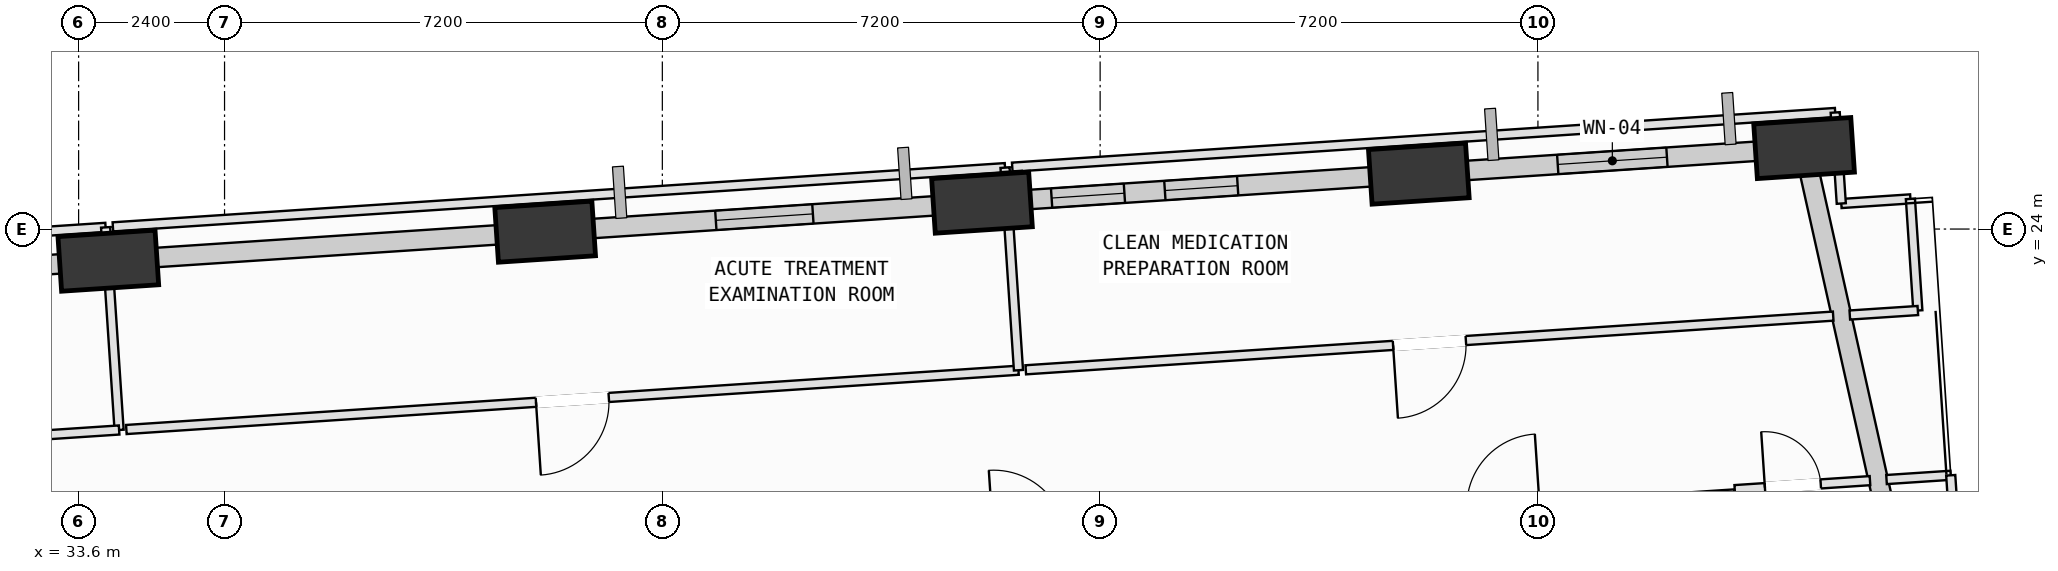
"""IFC4 building model, lengths in metres.
Left out: names, types, materials, properties, quantities, classifications, styles, units other than length and angle.
Written with IfcOpenShell. Run it as: python <this file> out.ifc"""

import sys

from ifc_helpers import new_model, si_unit, direction, frame, frame_2d, origin, origin_2d, place, context, subcontext, project, spatial, rectangle, extrude, element, fill, save


model = new_model("IFC4")
c1 = context("Model", 3, precision=1e-05, world=origin(), true_north=direction((0.0, 1.0)))
c2 = subcontext(c1, "Body", "Model", "MODEL_VIEW")
j1 = project(units=[si_unit("LENGTHUNIT", "METRE"), si_unit("PLANEANGLEUNIT", "RADIAN")], contexts=[c1])
p1 = place(None, origin())
s1 = spatial("IfcSite", under=j1, at=p1, CompositionType="ELEMENT")
p2 = place(p1, origin())
s2 = spatial("IfcBuilding", under=s1, at=p2, CompositionType="ELEMENT")
p3 = place(p2, frame((0.0, 0.0, 39.0)))
s3 = spatial("IfcBuildingStorey", under=s2, at=p3, CompositionType="ELEMENT", Elevation=39.0)
p4 = place(p3, frame((61.977, 25.332, 0.002), z_axis=(-0.003154789088, 0.116787865274, 0.99315187249), x_axis=(-0.995660271047, -0.092739816364, 0.007742810776)))
e1 = element("IfcColumn", 1, at=p4, inside=s3, PredefinedType="COLUMN", context=c2, shape_type="SweptSolid", body=[
    extrude(rectangle(XDim=1.6, YDim=0.9, at=origin_2d()), origin(), (0.0, 0.0, 1.0), 4.024),
])
p5 = place(p3, frame((55.641, 24.911, 0.002), z_axis=(-0.001216676206, 0.091007380225, 0.995849474792), x_axis=(-0.996830053403, -0.079331331611, 0.006031953025)))
e2 = element("IfcColumn", 2, at=p5, inside=s3, PredefinedType="COLUMN", context=c2, shape_type="SweptSolid", body=[
    extrude(rectangle(XDim=1.6, YDim=0.9, at=origin_2d()), origin(), (0.0, 0.0, 1.0), 4.013),
])
p6 = place(p3, frame((48.457, 24.434, 0.002), z_axis=(0.000975545854, 0.061520360422, 0.998105351936), x_axis=(-0.998724842729, -0.050319586866, 0.004077706819)))
e3 = element("IfcColumn", 3, at=p6, inside=s3, PredefinedType="COLUMN", context=c2, shape_type="SweptSolid", body=[
    extrude(rectangle(XDim=1.6, YDim=0.9, at=origin_2d()), origin(), (0.0, 0.0, 1.0), 4.004),
])
p7 = place(p3, frame((41.273, 23.957, 0.002), z_axis=(0.003235974371, 0.031810238631, 0.999488687874), x_axis=(-0.999382165175, 0.035082723346, 0.002119068778)))
e4 = element("IfcColumn", 4, at=p7, inside=s3, PredefinedType="COLUMN", context=c2, shape_type="SweptSolid", body=[
    extrude(rectangle(XDim=1.6, YDim=0.9, at=origin_2d()), origin(), (0.0, 0.0, 1.0), 3.999),
])
p8 = place(p3, frame((34.089, 23.479, 0.002), z_axis=(0.005436682512, 0.002076934892, 0.999983064269), x_axis=(-0.417992563266, 0.90845036644, 0.000385707127)))
e5 = element("IfcColumn", 5, at=p8, inside=s3, PredefinedType="COLUMN", context=c2, shape_type="SweptSolid", body=[
    extrude(rectangle(XDim=1.6, YDim=0.9, at=origin_2d()), origin(), (0.0, 0.0, 1.0), 3.997),
])
p9 = place(p3, frame((62.059, 24.966, 0.0), z_axis=(0.0, 0.0, 1.0), x_axis=(0.217983679512, -0.97595241455, 0.0)))
e6 = element("IfcWall", 6, at=p9, inside=s3, PredefinedType="SOLIDWALL", context=c2, shape_type="SweptSolid", body=[
    extrude(rectangle(XDim=8.614, YDim=0.32, at=frame_2d((4.307, 0.0))), origin(), (0.0, 0.0, 1.0), 3.165),
])
p10 = place(p3, frame((56.229, 24.95, 0.0), z_axis=(0.0, 0.0, 1.0), x_axis=(0.997801716967, 0.066270156308, 0.0)))
e7 = element("IfcWall", 7, at=p10, inside=s3, PredefinedType="SOLIDWALL", context=c2, shape_type="SweptSolid", body=[
    extrude(rectangle(XDim=5.209, YDim=0.32, at=frame_2d((2.604, 0.0))), origin(), (0.0, 0.0, 1.0), 3.165),
])
p11 = place(p10, frame((1.7, 0.0, 0.75)))
e8 = element("IfcOpeningElement", 8, at=p11, cuts=e7, PredefinedType="OPENING", context=c2, shape_type="SweptSolid", body=[
    extrude(rectangle(XDim=1.8, YDim=2.05, at=frame_2d((0.9, 1.025))), frame((0.0, 0.17, 0.0), z_axis=(0.0, -1.0, 0.0), x_axis=(1.0, 0.0, 0.0)), (0.0, 0.0, 1.0), 0.34),
])
p12 = place(p3, frame((49.061, 24.474, 0.0), z_axis=(0.0, 0.0, 1.0), x_axis=(0.99780251715, 0.066258107202, 0.0)))
e9 = element("IfcWall", 9, at=p12, inside=s3, PredefinedType="SOLIDWALL", context=c2, shape_type="SweptSolid", body=[
    extrude(rectangle(XDim=6.024, YDim=0.32, at=frame_2d((3.012, 0.0))), origin(), (0.0, 0.0, 1.0), 3.165),
])
p13 = place(p12, frame((2.409, 0.0, 0.75)))
e10 = element("IfcOpeningElement", 10, at=p13, cuts=e9, PredefinedType="OPENING", context=c2, shape_type="SweptSolid", body=[
    extrude(rectangle(XDim=1.2, YDim=1.75, at=frame_2d((0.6, 0.875))), frame((0.0, 0.17, 0.0), z_axis=(0.0, -1.0, 0.0), x_axis=(1.0, 0.0, 0.0)), (0.0, 0.0, 1.0), 0.34),
])
p14 = place(p12, frame((0.542, 0.0, 0.75)))
e11 = element("IfcOpeningElement", 11, at=p14, cuts=e9, PredefinedType="OPENING", context=c2, shape_type="SweptSolid", body=[
    extrude(rectangle(XDim=1.2, YDim=1.75, at=frame_2d((0.6, 0.875))), frame((0.0, 0.17, 0.0), z_axis=(0.0, -1.0, 0.0), x_axis=(1.0, 0.0, 0.0)), (0.0, 0.0, 1.0), 0.34),
])
p15 = place(p3, frame((41.887, 23.997, 0.0), z_axis=(0.0, 0.0, 1.0), x_axis=(0.997800436459, 0.066289433564, 0.0)))
e12 = element("IfcWall", 12, at=p15, inside=s3, PredefinedType="SOLIDWALL", context=c2, shape_type="SweptSolid", body=[
    extrude(rectangle(XDim=6.0, YDim=0.32, at=frame_2d((3.0, 0.0))), origin(), (0.0, 0.0, 1.0), 3.165),
])
p16 = place(p15, frame((2.198, 0.0, 0.75)))
e13 = element("IfcOpeningElement", 13, at=p16, cuts=e12, PredefinedType="OPENING", context=c2, shape_type="SweptSolid", body=[
    extrude(rectangle(XDim=1.6, YDim=1.95, at=frame_2d((0.8, 0.975))), frame((0.0, 0.17, 0.0), z_axis=(0.0, -1.0, 0.0), x_axis=(1.0, 0.0, 0.0)), (0.0, 0.0, 1.0), 0.34),
])
p17 = place(p3, frame((34.706, 23.521, 0.0), z_axis=(0.0, 0.0, 1.0), x_axis=(0.997802086271, 0.066264595619, 0.0)))
e14 = element("IfcWall", 14, at=p17, inside=s3, PredefinedType="SOLIDWALL", context=c2, shape_type="SweptSolid", body=[
    extrude(rectangle(XDim=5.987, YDim=0.32, at=frame_2d((2.994, 0.0))), origin(), (0.0, 0.0, 1.0), 3.165),
])
p18 = place(p3, frame((27.77, 23.06, 0.0), z_axis=(0.0, 0.0, 1.0), x_axis=(0.997801886961, 0.066267596741, 0.0)))
e15 = element("IfcWall", 15, at=p18, inside=s3, PredefinedType="SOLIDWALL", context=c2, shape_type="SweptSolid", body=[
    extrude(rectangle(XDim=5.736, YDim=0.32, at=frame_2d((2.868, 0.0))), origin(), (0.0, 0.0, 1.0), 3.165),
])
p19 = place(p18, frame((2.169, 0.0, 0.75)))
e16 = element("IfcOpeningElement", 16, at=p19, cuts=e15, PredefinedType="OPENING", context=c2, shape_type="SweptSolid", body=[
    extrude(rectangle(XDim=1.4, YDim=1.85, at=frame_2d((0.7, 0.925))), frame((0.0, 0.17, 0.0), z_axis=(0.0, -1.0, 0.0), x_axis=(1.0, 0.0, 0.0)), (0.0, 0.0, 1.0), 0.34),
])
p20 = place(p3, frame((53.218, 19.138, 0.0), z_axis=(0.0, 0.0, 1.0), x_axis=(0.99780392173, 0.066236951766, 0.0)))
e17 = element("IfcWall", 17, at=p20, inside=s3, PredefinedType="PARTITIONING", context=c2, shape_type="SweptSolid", body=[
    extrude(rectangle(XDim=7.641, YDim=0.15, at=frame_2d((3.82, 0.0))), origin(), (0.0, 0.0, 1.0), 3.78),
])
p21 = place(p20, frame((3.22, 0.0, 0.0)))
e18 = element("IfcOpeningElement", 18, at=p21, cuts=e17, PredefinedType="OPENING", context=c2, shape_type="SweptSolid", body=[
    extrude(rectangle(XDim=1.2, YDim=2.15, at=frame_2d((0.6, 1.075))), frame((0.0, 0.085, 0.0), z_axis=(0.0, -1.0, 0.0), x_axis=(1.0, 0.0, 0.0)), (0.0, 0.0, 1.0), 0.17),
])
p22 = place(p3, frame((27.666, 23.604, 0.0), z_axis=(0.0, 0.0, 1.0), x_axis=(0.99779680372, 0.066344091566, 0.0)))
e19 = element("IfcWall", 19, at=p22, inside=s3, PredefinedType="PARTITIONING", context=c2, shape_type="SweptSolid", body=[
    extrude(rectangle(XDim=6.392, YDim=0.15, at=frame_2d((3.196, 0.0))), origin(), (0.0, 0.0, 1.0), 3.78),
])
p23 = place(p3, frame((34.044, 24.028, 0.0), z_axis=(0.0, 0.0, 1.0), x_axis=(0.066509308686, -0.997785804598, 0.0)))
e20 = element("IfcWall", 20, at=p23, inside=s3, PredefinedType="PARTITIONING", context=c2, shape_type="SweptSolid", body=[
    extrude(rectangle(XDim=3.34, YDim=0.15, at=frame_2d((1.67, 0.0))), origin(), (0.0, 0.0, 1.0), 2.865),
])
p24 = place(p3, frame((34.266, 20.695, 0.0), z_axis=(0.0, 0.0, 1.0), x_axis=(-0.997806253018, -0.06620182352, 0.0)))
e21 = element("IfcWall", 21, at=p24, inside=s3, PredefinedType="PARTITIONING", context=c2, shape_type="SweptSolid", body=[
    extrude(rectangle(XDim=1.737, YDim=0.15, at=frame_2d((0.869, 0.0))), origin(), (0.0, 0.0, 1.0), 3.78),
])
p25 = place(p3, frame((49.057, 21.678, 0.0), z_axis=(0.0, 0.0, 1.0), x_axis=(-0.99779880156, -0.066314037763, 0.0)))
e22 = element("IfcWall", 22, at=p25, inside=s3, PredefinedType="PARTITIONING", context=c2, shape_type="SweptSolid", body=[
    extrude(rectangle(XDim=14.704, YDim=0.15, at=frame_2d((7.352, 0.0))), origin(), (0.0, 0.0, 1.0), 3.78),
])
p26 = place(p25, frame((6.752, 0.0, 0.0)))
e23 = element("IfcOpeningElement", 23, at=p26, cuts=e22, PredefinedType="OPENING", context=c2, shape_type="SweptSolid", body=[
    extrude(rectangle(XDim=1.2, YDim=2.15, at=frame_2d((0.6, 1.075))), frame((0.0, 0.085, 0.0), z_axis=(0.0, -1.0, 0.0), x_axis=(1.0, 0.0, 0.0)), (0.0, 0.0, 1.0), 0.17),
])
p27 = place(p3, frame((34.164, 24.036, 0.0), z_axis=(0.0, 0.0, 1.0), x_axis=(0.997803193852, 0.066247915726, 0.0)))
e24 = element("IfcWall", 24, at=p27, inside=s3, PredefinedType="PARTITIONING", context=c2, shape_type="SweptSolid", body=[
    extrude(rectangle(XDim=14.704, YDim=0.15, at=frame_2d((7.352, 0.0))), origin(), (0.0, 0.0, 1.0), 3.165),
])
p28 = place(p3, frame((48.836, 25.01, 0.0), z_axis=(0.0, 0.0, 1.0), x_axis=(0.066164777459, -0.997808710236, 0.0)))
e25 = element("IfcWall", 25, at=p28, inside=s3, PredefinedType="PARTITIONING", context=c2, shape_type="SweptSolid", body=[
    extrude(rectangle(XDim=3.339, YDim=0.15, at=frame_2d((1.67, 0.0))), origin(), (0.0, 0.0, 1.0), 3.78),
])
p29 = place(p3, frame((62.589, 24.42, 0.0), z_axis=(0.0, 0.0, 1.0), x_axis=(0.997763300026, 0.066846070347, 0.0)))
e26 = element("IfcWall", 26, at=p29, inside=s3, PredefinedType="PARTITIONING", context=c2, shape_type="SweptSolid", body=[
    extrude(rectangle(XDim=1.139, YDim=0.15, at=frame_2d((0.57, 0.0))), origin(), (0.0, 0.0, 1.0), 3.78),
])
p30 = place(p3, frame((63.726, 24.496, 0.0), z_axis=(0.0, 0.0, 1.0), x_axis=(0.066202009586, -0.997806240673, 0.0)))
e27 = element("IfcWall", 27, at=p30, inside=s3, PredefinedType="PARTITIONING", context=c2, shape_type="SweptSolid", body=[
    extrude(rectangle(XDim=1.84, YDim=0.15, at=frame_2d((0.92, 0.0))), origin(), (0.0, 0.0, 1.0), 3.78),
])
p31 = place(p3, frame((63.848, 22.66, 0.0), z_axis=(0.0, 0.0, 1.0), x_axis=(-0.99782161494, -0.065969877662, 0.0)))
e28 = element("IfcWall", 28, at=p31, inside=s3, PredefinedType="PARTITIONING", context=c2, shape_type="SweptSolid", body=[
    extrude(rectangle(XDim=1.121, YDim=0.15, at=frame_2d((0.561, 0.0))), origin(), (0.0, 0.0, 1.0), 3.78),
])
p32 = place(p3, frame((62.456, 22.568, 0.0), z_axis=(0.0, 0.0, 1.0), x_axis=(-0.997796183511, -0.066353418686, 0.0)))
e29 = element("IfcWall", 29, at=p32, inside=s3, PredefinedType="PARTITIONING", context=c2, shape_type="SweptSolid", body=[
    extrude(rectangle(XDim=13.308, YDim=0.15, at=frame_2d((6.654, 0.0))), origin(), (0.0, 0.0, 1.0), 3.78),
])
p33 = place(p32, frame((6.054, 0.0, 0.0)))
e30 = element("IfcOpeningElement", 30, at=p33, cuts=e29, PredefinedType="OPENING", context=c2, shape_type="SweptSolid", body=[
    extrude(rectangle(XDim=1.2, YDim=2.15, at=frame_2d((0.6, 1.075))), frame((0.0, 0.085, 0.0), z_axis=(0.0, -1.0, 0.0), x_axis=(1.0, 0.0, 0.0)), (0.0, 0.0, 1.0), 0.17),
])
p34 = place(p3, frame((48.955, 25.018, 0.0), z_axis=(0.0, 0.0, 1.0), x_axis=(0.997801454767, 0.066274104022, 0.0)))
e31 = element("IfcWall", 31, at=p34, inside=s3, PredefinedType="PARTITIONING", context=c2, shape_type="SweptSolid", body=[
    extrude(rectangle(XDim=13.564, YDim=0.15, at=frame_2d((6.782, 0.0))), origin(), (0.0, 0.0, 1.0), 3.165),
])
p35 = place(p3, frame((62.489, 25.917, 0.0), z_axis=(0.0, 0.0, 1.0), x_axis=(0.066713404028, -0.997772179269, 0.0)))
e32 = element("IfcWall", 32, at=p35, inside=s3, PredefinedType="PARTITIONING", context=c2, shape_type="SweptSolid", body=[
    extrude(rectangle(XDim=1.5, YDim=0.15, at=frame_2d((0.75, 0.0))), origin(), (0.0, 0.0, 1.0), 3.165),
])
p36 = place(p3, frame((60.837, 19.714, 0.0), z_axis=(0.0, 0.0, 1.0), x_axis=(0.997794839956, 0.066373619431, 0.0)))
e33 = element("IfcWall", 33, at=p36, inside=s3, PredefinedType="PARTITIONING", context=c2, shape_type="SweptSolid", body=[
    extrude(rectangle(XDim=2.229, YDim=0.15, at=frame_2d((1.115, 0.0))), origin(), (0.0, 0.0, 1.0), 3.78),
])
p37 = place(p36, frame((0.497, 0.0, 0.0)))
e34 = element("IfcOpeningElement", 34, at=p37, cuts=e33, PredefinedType="OPENING", context=c2, shape_type="SweptSolid", body=[
    extrude(rectangle(XDim=0.92, YDim=2.1, at=frame_2d((0.46, 1.05))), frame((0.0, 0.085, 0.0), z_axis=(0.0, -1.0, 0.0), x_axis=(1.0, 0.0, 0.0)), (0.0, 0.0, 1.0), 0.17),
])
p38 = place(p3, frame((63.333, 19.88, 0.0), z_axis=(0.0, 0.0, 1.0), x_axis=(0.997805527361, 0.06621275985, 0.0)))
e35 = element("IfcWall", 35, at=p38, inside=s3, PredefinedType="PARTITIONING", context=c2, shape_type="SweptSolid", body=[
    extrude(rectangle(XDim=1.058, YDim=0.15, at=frame_2d((0.529, 0.0))), origin(), (0.0, 0.0, 1.0), 3.78),
])
p39 = place(p3, frame((64.389, 19.95, 0.0), z_axis=(0.0, 0.0, 1.0), x_axis=(0.066268176923, -0.997801848428, 0.0)))
e36 = element("IfcWall", 36, at=p39, inside=s3, PredefinedType="PARTITIONING", context=c2, shape_type="SweptSolid", body=[
    extrude(rectangle(XDim=12.92, YDim=0.15, at=frame_2d((6.46, 0.0))), origin(), (0.0, 0.0, 1.0), 3.165),
])
p40 = place(p11, origin())
e37 = element("IfcWindow", 37, at=p40, inside=s3, PartitioningType="SINGLE_PANEL", PredefinedType="WINDOW", context=c2, shape_type="SweptSolid", body=[
    extrude(rectangle(XDim=1.8, YDim=2.05, at=frame_2d((0.9, 1.025))), frame((0.0, 0.03, 0.0), z_axis=(0.0, -1.0, 0.0), x_axis=(1.0, 0.0, 0.0)), (0.0, 0.0, 1.0), 0.06),
])
fill(e8, e37)
p41 = place(p13, origin())
e38 = element("IfcWindow", 38, at=p41, inside=s3, PartitioningType="SINGLE_PANEL", PredefinedType="WINDOW", context=c2, shape_type="SweptSolid", body=[
    extrude(rectangle(XDim=1.2, YDim=1.75, at=frame_2d((0.6, 0.875))), frame((0.0, 0.03, 0.0), z_axis=(0.0, -1.0, 0.0), x_axis=(1.0, 0.0, 0.0)), (0.0, 0.0, 1.0), 0.06),
])
fill(e10, e38)
p42 = place(p14, origin())
e39 = element("IfcWindow", 39, at=p42, inside=s3, PartitioningType="SINGLE_PANEL", PredefinedType="WINDOW", context=c2, shape_type="SweptSolid", body=[
    extrude(rectangle(XDim=1.2, YDim=1.75, at=frame_2d((0.6, 0.875))), frame((0.0, 0.03, 0.0), z_axis=(0.0, -1.0, 0.0), x_axis=(1.0, 0.0, 0.0)), (0.0, 0.0, 1.0), 0.06),
])
fill(e11, e39)
p43 = place(p16, origin())
e40 = element("IfcWindow", 40, at=p43, inside=s3, PartitioningType="SINGLE_PANEL", PredefinedType="WINDOW", context=c2, shape_type="SweptSolid", body=[
    extrude(rectangle(XDim=1.6, YDim=1.95, at=frame_2d((0.8, 0.975))), frame((0.0, 0.03, 0.0), z_axis=(0.0, -1.0, 0.0), x_axis=(1.0, 0.0, 0.0)), (0.0, 0.0, 1.0), 0.06),
])
fill(e13, e40)
p44 = place(p26, origin())
e41 = element("IfcDoor", 41, at=p44, inside=s3, OperationType="SINGLE_SWING_RIGHT", PredefinedType="DOOR", context=c2, shape_type="SweptSolid", body=[
    extrude(rectangle(XDim=1.2, YDim=2.15, at=frame_2d((0.6, 1.075))), frame((0.0, 0.025, 0.0), z_axis=(0.0, -1.0, 0.0), x_axis=(1.0, 0.0, 0.0)), (0.0, 0.0, 1.0), 0.05),
])
fill(e23, e41)
p45 = place(p33, origin())
e42 = element("IfcDoor", 42, at=p45, inside=s3, OperationType="SINGLE_SWING_RIGHT", PredefinedType="DOOR", context=c2, shape_type="SweptSolid", body=[
    extrude(rectangle(XDim=1.2, YDim=2.15, at=frame_2d((0.6, 1.075))), frame((0.0, 0.025, 0.0), z_axis=(0.0, -1.0, 0.0), x_axis=(1.0, 0.0, 0.0)), (0.0, 0.0, 1.0), 0.05),
])
fill(e30, e42)
p46 = place(p37, origin())
e43 = element("IfcDoor", 43, at=p46, inside=s3, OperationType="SINGLE_SWING_LEFT", PredefinedType="DOOR", context=c2, shape_type="SweptSolid", body=[
    extrude(rectangle(XDim=0.92, YDim=2.1, at=frame_2d((0.46, 1.05))), frame((0.0, 0.025, 0.0), z_axis=(0.0, -1.0, 0.0), x_axis=(1.0, 0.0, 0.0)), (0.0, 0.0, 1.0), 0.05),
])
fill(e34, e43)
save(model, sys.argv[1])
